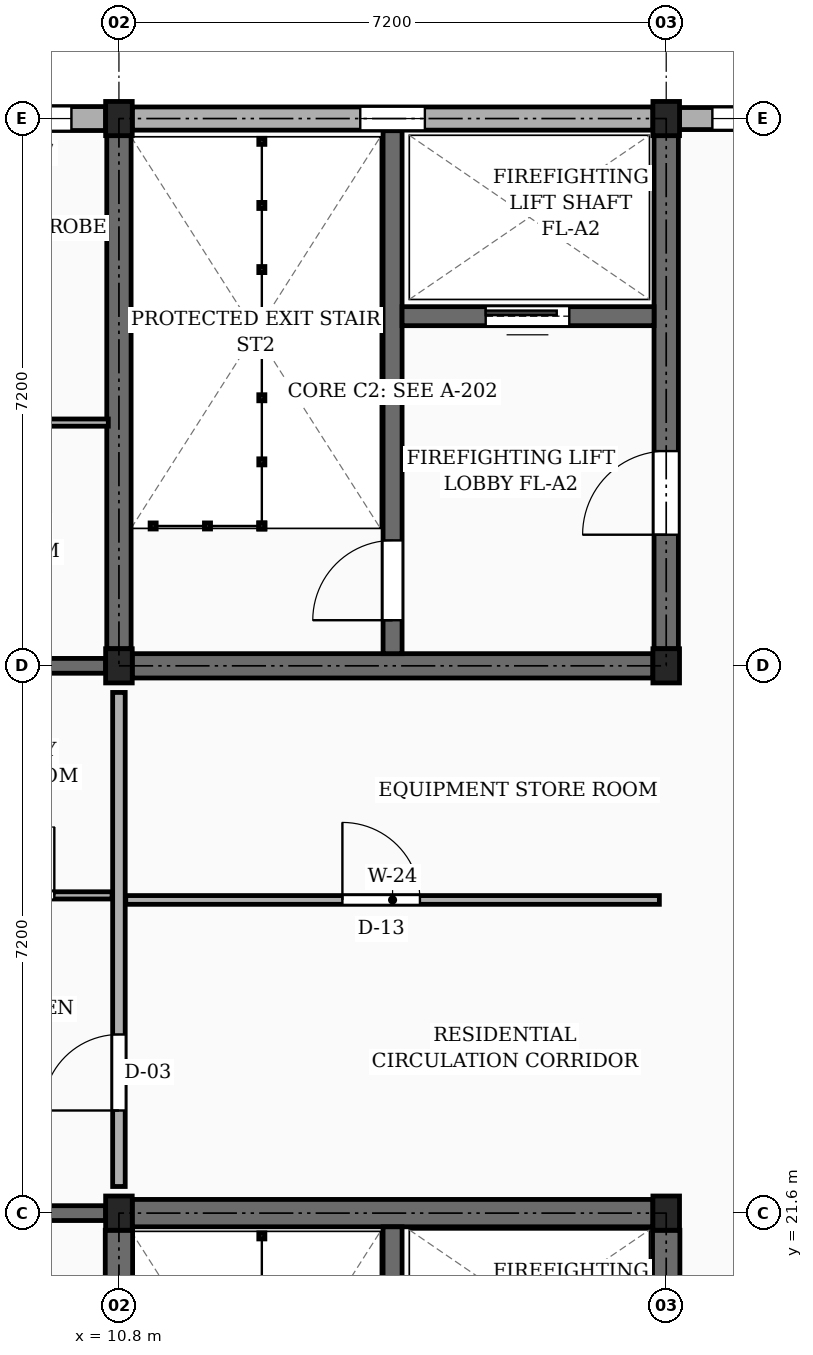
"""IFC4 building model, lengths in metres.
Left out: names, types, materials, properties, quantities, classifications, styles, units other than length and angle.
Written with IfcOpenShell. Run it as: python <this file> out.ifc"""

import sys

from ifc_helpers import new_model, si_unit, direction, frame, frame_2d, origin, origin_2d, place, context, subcontext, project, spatial, rectangle, extrude, element, fill, save


model = new_model("IFC4")
c1 = context("Model", 3, precision=1e-05, world=origin(), true_north=direction((0.0, 1.0)))
c2 = subcontext(c1, "Body", "Model", "MODEL_VIEW")
j1 = project(units=[si_unit("LENGTHUNIT", "METRE"), si_unit("PLANEANGLEUNIT", "RADIAN")], contexts=[c1])
p1 = place(None, origin())
s1 = spatial("IfcSite", under=j1, at=p1, CompositionType="ELEMENT")
p2 = place(p1, origin())
s2 = spatial("IfcBuilding", under=s1, at=p2, CompositionType="ELEMENT")
p3 = place(p2, frame((0.0, 0.0, 48.6)))
s3 = spatial("IfcBuildingStorey", under=s2, at=p3, CompositionType="ELEMENT", Elevation=48.6)
for number, where, z_axis, x_axis in (
    (1, (10.8, 21.6, 0.0), (0.0, 0.0, 1.0), (1.0, 0.0, 0.0)),
    (2, (10.8, 28.8, 0.0), (0.0, 0.0, 1.0), (1.0, 0.0, 0.0)),
    (3, (10.8, 36.0, 0.0), (0.0, 0.0, 1.0), (1.0, 0.0, 0.0)),
    (4, (18.0, 21.6, 0.0), (0.0, 0.0, 1.0), (1.0, 0.0, 0.0)),
    (5, (18.0, 28.8, 0.0), (0.0, 0.0, 1.0), (1.0, 0.0, 0.0)),
    (6, (18.0, 36.0, 0.0), (0.0, 0.0, 1.0), (1.0, 0.0, 0.0)),
):
    element("IfcColumn", number, at=place(p3, frame(where, z_axis=z_axis, x_axis=x_axis)), inside=s3, PredefinedType="COLUMN", context=c2, shape_type="SweptSolid", body=[
        extrude(rectangle(XDim=0.35, YDim=0.45, at=origin_2d()), origin(), (0.0, 0.0, 1.0), 3.15),
    ])
p4 = place(p3, frame((3.775, 21.6, 0.0), z_axis=(0.0, 0.0, 1.0), x_axis=(1.0, 0.0, 0.0)))
e7 = element("IfcWall", 7, at=p4, inside=s3, PredefinedType="SOLIDWALL", context=c2, shape_type="SweptSolid", body=[
    extrude(rectangle(XDim=6.85, YDim=0.195, at=frame_2d((3.425, 0.0))), origin(), (0.0, 0.0, 1.0), 2.22),
])
p5 = place(p3, frame((3.775, 28.8, 0.0), z_axis=(0.0, 0.0, 1.0), x_axis=(1.0, 0.0, 0.0)))
e8 = element("IfcWall", 8, at=p5, inside=s3, PredefinedType="SOLIDWALL", context=c2, shape_type="SweptSolid", body=[
    extrude(rectangle(XDim=6.85, YDim=0.195, at=frame_2d((3.425, 0.0))), origin(), (0.0, 0.0, 1.0), 2.22),
])
p6 = place(p5, frame((1.35, 0.0, 0.0)))
e9 = element("IfcOpeningElement", 9, at=p6, cuts=e8, PredefinedType="OPENING", context=c2, shape_type="SweptSolid", body=[
    extrude(rectangle(XDim=0.98, YDim=2.12, at=frame_2d((0.49, 1.06))), frame((0.0, 0.107, 0.0), z_axis=(0.0, -1.0, 0.0), x_axis=(1.0, 0.0, 0.0)), (0.0, 0.0, 1.0), 0.215),
])
p7 = place(p3, frame((25.025, 36.0, 0.0), z_axis=(0.0, 0.0, 1.0), x_axis=(-1.0, 0.0, 0.0)))
e10 = element("IfcWall", 10, at=p7, inside=s3, PredefinedType="SOLIDWALL", context=c2, shape_type="SweptSolid", body=[
    extrude(rectangle(XDim=6.85, YDim=0.29, at=frame_2d((3.425, 0.0))), origin(), (0.0, 0.0, 1.0), 2.46),
])
p8 = place(p7, frame((1.103, 0.0, 0.78)))
e11 = element("IfcOpeningElement", 11, at=p8, cuts=e10, PredefinedType="OPENING", context=c2, shape_type="SweptSolid", body=[
    extrude(rectangle(XDim=1.0, YDim=1.15, at=frame_2d((0.5, 0.575))), frame((0.0, 0.155, 0.0), z_axis=(0.0, -1.0, 0.0), x_axis=(1.0, 0.0, 0.0)), (0.0, 0.0, 1.0), 0.31),
])
p9 = place(p7, frame((3.415, 0.0, 0.78)))
e12 = element("IfcOpeningElement", 12, at=p9, cuts=e10, PredefinedType="OPENING", context=c2, shape_type="SweptSolid", body=[
    extrude(rectangle(XDim=1.16, YDim=1.15, at=frame_2d((0.58, 0.575))), frame((0.0, 0.155, 0.0), z_axis=(0.0, -1.0, 0.0), x_axis=(1.0, 0.0, 0.0)), (0.0, 0.0, 1.0), 0.31),
])
p10 = place(p7, frame((5.218, 0.0, 0.78)))
e13 = element("IfcOpeningElement", 13, at=p10, cuts=e10, PredefinedType="OPENING", context=c2, shape_type="SweptSolid", body=[
    extrude(rectangle(XDim=1.2, YDim=1.26, at=frame_2d((0.6, 0.63))), frame((0.0, 0.155, 0.0), z_axis=(0.0, -1.0, 0.0), x_axis=(1.0, 0.0, 0.0)), (0.0, 0.0, 1.0), 0.31),
])
p11 = place(p3, frame((17.825, 36.0, 0.0), z_axis=(0.0, 0.0, 1.0), x_axis=(-1.0, 0.0, 0.0)))
e14 = element("IfcWall", 14, at=p11, inside=s3, PredefinedType="SOLIDWALL", context=c2, shape_type="SweptSolid", body=[
    extrude(rectangle(XDim=6.85, YDim=0.305, at=frame_2d((3.425, 0.0))), origin(), (0.0, 0.0, 1.0), 2.46),
])
p12 = place(p11, frame((3.0, 0.0, 0.9)))
e15 = element("IfcOpeningElement", 15, at=p12, cuts=e14, PredefinedType="OPENING", context=c2, shape_type="SweptSolid", body=[
    extrude(rectangle(XDim=0.85, YDim=1.15, at=frame_2d((0.425, 0.575))), frame((0.0, 0.163, 0.0), z_axis=(0.0, -1.0, 0.0), x_axis=(1.0, 0.0, 0.0)), (0.0, 0.0, 1.0), 0.325),
])
p13 = place(p3, frame((10.625, 36.0, 0.0), z_axis=(0.0, 0.0, 1.0), x_axis=(-1.0, 0.0, 0.0)))
e16 = element("IfcWall", 16, at=p13, inside=s3, PredefinedType="SOLIDWALL", context=c2, shape_type="SweptSolid", body=[
    extrude(rectangle(XDim=6.85, YDim=0.315, at=frame_2d((3.425, 0.0))), origin(), (0.0, 0.0, 1.0), 2.46),
])
p14 = place(p13, frame((0.45, 0.0, 0.78)))
e17 = element("IfcOpeningElement", 17, at=p14, cuts=e16, PredefinedType="OPENING", context=c2, shape_type="SweptSolid", body=[
    extrude(rectangle(XDim=1.32, YDim=1.15, at=frame_2d((0.66, 0.575))), frame((0.0, 0.167, 0.0), z_axis=(0.0, -1.0, 0.0), x_axis=(1.0, 0.0, 0.0)), (0.0, 0.0, 1.0), 0.335),
])
p15 = place(p13, frame((4.65, 0.0, 0.78)))
e18 = element("IfcOpeningElement", 18, at=p15, cuts=e16, PredefinedType="OPENING", context=c2, shape_type="SweptSolid", body=[
    extrude(rectangle(XDim=0.88, YDim=1.26, at=frame_2d((0.44, 0.63))), frame((0.0, 0.167, 0.0), z_axis=(0.0, -1.0, 0.0), x_axis=(1.0, 0.0, 0.0)), (0.0, 0.0, 1.0), 0.335),
])
p16 = place(p3, frame((10.8, 14.625, 0.0), z_axis=(0.0, 0.0, 1.0), x_axis=(0.0, 1.0, 0.0)))
e19 = element("IfcWall", 19, at=p16, inside=s3, PredefinedType="SHEAR", context=c2, shape_type="SweptSolid", body=[
    extrude(rectangle(XDim=6.75, YDim=0.36, at=frame_2d((3.375, 0.0))), origin(), (0.0, 0.0, 1.0), 2.89),
])
p17 = place(p3, frame((10.975, 21.6, 0.0), z_axis=(0.0, 0.0, 1.0), x_axis=(1.0, 0.0, 0.0)))
e20 = element("IfcWall", 20, at=p17, inside=s3, PredefinedType="SHEAR", context=c2, shape_type="SweptSolid", body=[
    extrude(rectangle(XDim=6.85, YDim=0.36, at=frame_2d((3.425, 0.0))), origin(), (0.0, 0.0, 1.0), 2.89),
])
p18 = place(p3, frame((18.0, 14.625, 0.0), z_axis=(0.0, 0.0, 1.0), x_axis=(0.0, 1.0, 0.0)))
e21 = element("IfcWall", 21, at=p18, inside=s3, PredefinedType="SHEAR", context=c2, shape_type="SweptSolid", body=[
    extrude(rectangle(XDim=6.75, YDim=0.36, at=frame_2d((3.375, 0.0))), origin(), (0.0, 0.0, 1.0), 2.89),
])
p19 = place(p18, frame((1.5, 0.0, 0.0)))
e22 = element("IfcOpeningElement", 22, at=p19, cuts=e21, PredefinedType="OPENING", context=c2, shape_type="SweptSolid", body=[
    extrude(rectangle(XDim=1.1, YDim=2.15, at=frame_2d((0.55, 1.075))), frame((0.0, 0.19, 0.0), z_axis=(0.0, -1.0, 0.0), x_axis=(1.0, 0.0, 0.0)), (0.0, 0.0, 1.0), 0.38),
])
p20 = place(p3, frame((14.4, 14.58, 0.0), z_axis=(0.0, 0.0, 1.0), x_axis=(0.0, 1.0, 0.0)))
e23 = element("IfcWall", 23, at=p20, inside=s3, PredefinedType="SHEAR", context=c2, shape_type="SweptSolid", body=[
    extrude(rectangle(XDim=6.84, YDim=0.25, at=frame_2d((3.42, 0.0))), origin(), (0.0, 0.0, 1.0), 2.89),
])
p21 = place(p20, frame((0.42, 0.0, 0.0)))
e24 = element("IfcOpeningElement", 24, at=p21, cuts=e23, PredefinedType="OPENING", context=c2, shape_type="SweptSolid", body=[
    extrude(rectangle(XDim=1.05, YDim=2.15, at=frame_2d((0.525, 1.075))), frame((0.0, 0.135, 0.0), z_axis=(0.0, -1.0, 0.0), x_axis=(1.0, 0.0, 0.0)), (0.0, 0.0, 1.0), 0.27),
])
p22 = place(p3, frame((10.8, 29.025, 0.0), z_axis=(0.0, 0.0, 1.0), x_axis=(0.0, 1.0, 0.0)))
e25 = element("IfcWall", 25, at=p22, inside=s3, PredefinedType="SHEAR", context=c2, shape_type="SweptSolid", body=[
    extrude(rectangle(XDim=6.75, YDim=0.32, at=frame_2d((3.375, 0.0))), origin(), (0.0, 0.0, 1.0), 2.89),
])
p23 = place(p3, frame((18.0, 29.025, 0.0), z_axis=(0.0, 0.0, 1.0), x_axis=(0.0, 1.0, 0.0)))
e26 = element("IfcWall", 26, at=p23, inside=s3, PredefinedType="SHEAR", context=c2, shape_type="SweptSolid", body=[
    extrude(rectangle(XDim=6.75, YDim=0.32, at=frame_2d((3.375, 0.0))), origin(), (0.0, 0.0, 1.0), 2.89),
])
p24 = place(p23, frame((1.5, 0.0, 0.0)))
e27 = element("IfcOpeningElement", 27, at=p24, cuts=e26, PredefinedType="OPENING", context=c2, shape_type="SweptSolid", body=[
    extrude(rectangle(XDim=1.1, YDim=2.15, at=frame_2d((0.55, 1.075))), frame((0.0, 0.17, 0.0), z_axis=(0.0, -1.0, 0.0), x_axis=(1.0, 0.0, 0.0)), (0.0, 0.0, 1.0), 0.34),
])
p25 = place(p3, frame((10.975, 28.8, 0.0), z_axis=(0.0, 0.0, 1.0), x_axis=(1.0, 0.0, 0.0)))
e28 = element("IfcWall", 28, at=p25, inside=s3, PredefinedType="SHEAR", context=c2, shape_type="SweptSolid", body=[
    extrude(rectangle(XDim=6.85, YDim=0.32, at=frame_2d((3.425, 0.0))), origin(), (0.0, 0.0, 1.0), 2.89),
])
p26 = place(p3, frame((14.4, 28.96, 0.0), z_axis=(0.0, 0.0, 1.0), x_axis=(0.0, 1.0, 0.0)))
e29 = element("IfcWall", 29, at=p26, inside=s3, PredefinedType="SHEAR", context=c2, shape_type="SweptSolid", body=[
    extrude(rectangle(XDim=6.88, YDim=0.25, at=frame_2d((3.44, 0.0))), origin(), (0.0, 0.0, 1.0), 2.89),
])
p27 = place(p26, frame((0.44, 0.0, 0.0)))
e30 = element("IfcOpeningElement", 30, at=p27, cuts=e29, PredefinedType="OPENING", context=c2, shape_type="SweptSolid", body=[
    extrude(rectangle(XDim=1.05, YDim=2.15, at=frame_2d((0.525, 1.075))), frame((0.0, 0.135, 0.0), z_axis=(0.0, -1.0, 0.0), x_axis=(1.0, 0.0, 0.0)), (0.0, 0.0, 1.0), 0.27),
])
p28 = place(p3, frame((14.525, 33.4, 0.0), z_axis=(0.0, 0.0, 1.0), x_axis=(1.0, 0.0, 0.0)))
e31 = element("IfcWall", 31, at=p28, inside=s3, PredefinedType="SHEAR", context=c2, shape_type="SweptSolid", body=[
    extrude(rectangle(XDim=3.315, YDim=0.25, at=frame_2d((1.658, 0.0))), origin(), (0.0, 0.0, 1.0), 2.89),
])
p29 = place(p28, frame((1.1, 0.0, 0.0)))
e32 = element("IfcOpeningElement", 32, at=p29, cuts=e31, PredefinedType="OPENING", context=c2, shape_type="SweptSolid", body=[
    extrude(rectangle(XDim=1.1, YDim=2.2, at=frame_2d((0.55, 1.1))), frame((0.0, 0.135, 0.0), z_axis=(0.0, -1.0, 0.0), x_axis=(1.0, 0.0, 0.0)), (0.0, 0.0, 1.0), 0.27),
])
p30 = place(p3, frame((10.8, 21.95, 0.0), z_axis=(0.0, 0.0, 1.0), x_axis=(0.0, 1.0, 0.0)))
e33 = element("IfcWall", 33, at=p30, inside=s3, PredefinedType="PARTITIONING", context=c2, shape_type="SweptSolid", body=[
    extrude(rectangle(XDim=6.5, YDim=0.165, at=frame_2d((3.25, 0.0))), origin(), (0.0, 0.0, 1.0), 2.325),
])
p31 = place(p30, frame((1.0, 0.0, 0.0)))
e34 = element("IfcOpeningElement", 34, at=p31, cuts=e33, PredefinedType="OPENING", context=c2, shape_type="SweptSolid", body=[
    extrude(rectangle(XDim=1.0, YDim=2.15, at=frame_2d((0.5, 1.075))), frame((0.0, 0.093, 0.0), z_axis=(0.0, -1.0, 0.0), x_axis=(1.0, 0.0, 0.0)), (0.0, 0.0, 1.0), 0.185),
])
p32 = place(p3, frame((10.89, 25.72, 0.0), z_axis=(0.0, 0.0, 1.0), x_axis=(1.0, 0.0, 0.0)))
e35 = element("IfcWall", 35, at=p32, inside=s3, PredefinedType="PARTITIONING", context=c2, shape_type="SweptSolid", body=[
    extrude(rectangle(XDim=7.02, YDim=0.115, at=frame_2d((3.51, 0.0))), origin(), (0.0, 0.0, 1.0), 2.325),
])
p33 = place(p32, frame((2.85, 0.0, 0.0)))
e36 = element("IfcOpeningElement", 36, at=p33, cuts=e35, PredefinedType="OPENING", context=c2, shape_type="SweptSolid", body=[
    extrude(rectangle(XDim=1.02, YDim=2.15, at=frame_2d((0.51, 1.075))), frame((0.0, 0.067, 0.0), z_axis=(0.0, -1.0, 0.0), x_axis=(1.0, 0.0, 0.0)), (0.0, 0.0, 1.0), 0.135),
])
p34 = place(p3, frame((8.29, 25.78, 0.0), z_axis=(0.0, 0.0, 1.0), x_axis=(1.0, 0.0, 0.0)))
e37 = element("IfcWall", 37, at=p34, inside=s3, PredefinedType="PARTITIONING", context=c2, shape_type="SweptSolid", body=[
    extrude(rectangle(XDim=2.42, YDim=0.095, at=frame_2d((1.21, 0.0))), origin(), (0.0, 0.0, 1.0), 2.325),
])
p35 = place(p34, frame((0.76, 0.0, 0.0)))
e38 = element("IfcOpeningElement", 38, at=p35, cuts=e37, PredefinedType="OPENING", context=c2, shape_type="SweptSolid", body=[
    extrude(rectangle(XDim=0.9, YDim=2.05, at=frame_2d((0.45, 1.025))), frame((0.0, 0.058, 0.0), z_axis=(0.0, -1.0, 0.0), x_axis=(1.0, 0.0, 0.0)), (0.0, 0.0, 1.0), 0.115),
])
p36 = place(p3, frame((7.27, 32.0, 0.0), z_axis=(0.0, 0.0, 1.0), x_axis=(1.0, 0.0, 0.0)))
e39 = element("IfcWall", 39, at=p36, inside=s3, PredefinedType="PARTITIONING", context=c2, shape_type="SweptSolid", body=[
    extrude(rectangle(XDim=3.39, YDim=0.095, at=frame_2d((1.695, 0.0))), origin(), (0.0, 0.0, 1.0), 2.325),
])
p37 = place(p10, origin())
e40 = element("IfcWindow", 40, at=p37, inside=s3, PartitioningType="SINGLE_PANEL", PredefinedType="WINDOW", context=c2, shape_type="SweptSolid", body=[
    extrude(rectangle(XDim=1.2, YDim=1.26, at=frame_2d((0.6, 0.63))), frame((0.0, 0.03, 0.0), z_axis=(0.0, -1.0, 0.0), x_axis=(1.0, 0.0, 0.0)), (0.0, 0.0, 1.0), 0.06),
])
fill(e13, e40)
p38 = place(p12, origin())
e41 = element("IfcWindow", 41, at=p38, inside=s3, PartitioningType="SINGLE_PANEL", PredefinedType="WINDOW", context=c2, shape_type="SweptSolid", body=[
    extrude(rectangle(XDim=0.85, YDim=1.15, at=frame_2d((0.425, 0.575))), frame((0.0, 0.03, 0.0), z_axis=(0.0, -1.0, 0.0), x_axis=(1.0, 0.0, 0.0)), (0.0, 0.0, 1.0), 0.06),
])
fill(e15, e41)
p39 = place(p14, origin())
e42 = element("IfcWindow", 42, at=p39, inside=s3, PartitioningType="SINGLE_PANEL", PredefinedType="WINDOW", context=c2, shape_type="SweptSolid", body=[
    extrude(rectangle(XDim=1.32, YDim=1.15, at=frame_2d((0.66, 0.575))), frame((0.0, 0.03, 0.0), z_axis=(0.0, -1.0, 0.0), x_axis=(1.0, 0.0, 0.0)), (0.0, 0.0, 1.0), 0.06),
])
fill(e17, e42)
p40 = place(p24, frame((1.1, 0.0, 0.0), z_axis=(0.0, 0.0, 1.0), x_axis=(-1.0, 0.0, 0.0)))
e43 = element("IfcDoor", 43, at=p40, inside=s3, OperationType="SINGLE_SWING_LEFT", PredefinedType="DOOR", context=c2, shape_type="SweptSolid", body=[
    extrude(rectangle(XDim=1.1, YDim=2.15, at=frame_2d((0.55, 1.075))), frame((0.0, 0.025, 0.0), z_axis=(0.0, -1.0, 0.0), x_axis=(1.0, 0.0, 0.0)), (0.0, 0.0, 1.0), 0.05),
])
fill(e27, e43)
p41 = place(p27, origin())
e44 = element("IfcDoor", 44, at=p41, inside=s3, OperationType="SINGLE_SWING_LEFT", PredefinedType="DOOR", context=c2, shape_type="SweptSolid", body=[
    extrude(rectangle(XDim=1.05, YDim=2.15, at=frame_2d((0.525, 1.075))), frame((0.0, 0.025, 0.0), z_axis=(0.0, -1.0, 0.0), x_axis=(1.0, 0.0, 0.0)), (0.0, 0.0, 1.0), 0.05),
])
fill(e30, e44)
p42 = place(p29, origin())
e45 = element("IfcDoor", 45, at=p42, inside=s3, OperationType="SLIDING_TO_LEFT", PredefinedType="DOOR", context=c2, shape_type="SweptSolid", body=[
    extrude(rectangle(XDim=1.1, YDim=2.2, at=frame_2d((0.55, 1.1))), frame((0.0, 0.025, 0.0), z_axis=(0.0, -1.0, 0.0), x_axis=(1.0, 0.0, 0.0)), (0.0, 0.0, 1.0), 0.05),
])
fill(e32, e45)
p43 = place(p31, origin())
e46 = element("IfcDoor", 46, at=p43, inside=s3, OperationType="SINGLE_SWING_LEFT", PredefinedType="DOOR", context=c2, shape_type="SweptSolid", body=[
    extrude(rectangle(XDim=1.0, YDim=2.15, at=frame_2d((0.5, 1.075))), frame((0.0, 0.025, 0.0), z_axis=(0.0, -1.0, 0.0), x_axis=(1.0, 0.0, 0.0)), (0.0, 0.0, 1.0), 0.05),
])
fill(e34, e46)
p44 = place(p33, origin())
e47 = element("IfcDoor", 47, at=p44, inside=s3, OperationType="SINGLE_SWING_LEFT", PredefinedType="DOOR", context=c2, shape_type="SweptSolid", body=[
    extrude(rectangle(XDim=1.02, YDim=2.15, at=frame_2d((0.51, 1.075))), frame((0.0, 0.025, 0.0), z_axis=(0.0, -1.0, 0.0), x_axis=(1.0, 0.0, 0.0)), (0.0, 0.0, 1.0), 0.05),
])
fill(e36, e47)
p45 = place(p35, origin())
e48 = element("IfcDoor", 48, at=p45, inside=s3, OperationType="SINGLE_SWING_RIGHT", PredefinedType="DOOR", context=c2, shape_type="SweptSolid", body=[
    extrude(rectangle(XDim=0.9, YDim=2.05, at=frame_2d((0.45, 1.025))), frame((0.0, 0.025, 0.0), z_axis=(0.0, -1.0, 0.0), x_axis=(1.0, 0.0, 0.0)), (0.0, 0.0, 1.0), 0.05),
])
fill(e38, e48)
save(model, sys.argv[1])
